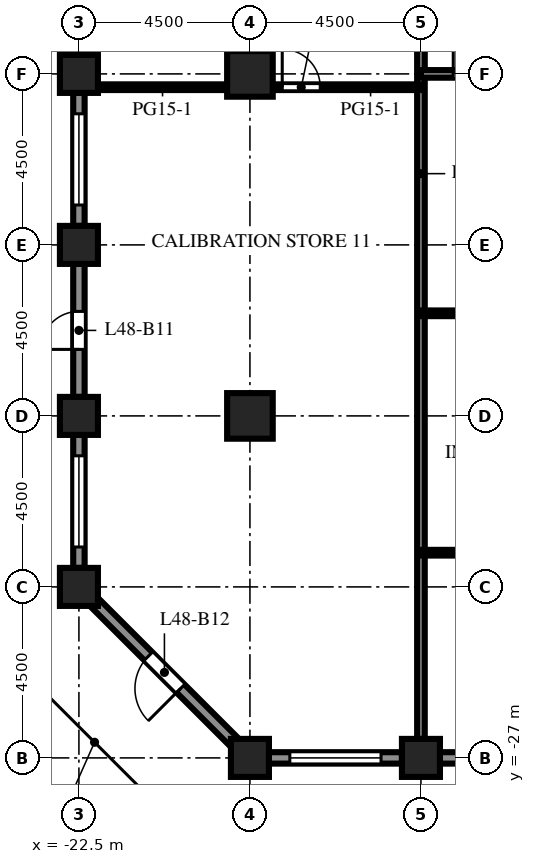
"""IFC4 building model, lengths in metres.
Left out: names, types, materials, properties, quantities, classifications, styles, units other than length and angle.
Written with IfcOpenShell. Run it as: python <this file> out.ifc"""

import sys

from ifc_helpers import new_model, si_unit, direction, frame, frame_2d, origin, origin_2d, place, context, subcontext, project, spatial, rectangle, extrude, element, fill, save


model = new_model("IFC4")
c1 = context("Model", 3, precision=1e-05, world=origin(), true_north=direction((0.0, 1.0)))
c2 = subcontext(c1, "Body", "Model", "MODEL_VIEW")
j1 = project(units=[si_unit("LENGTHUNIT", "METRE"), si_unit("PLANEANGLEUNIT", "RADIAN")], contexts=[c1])
p1 = place(None, origin())
s1 = spatial("IfcSite", under=j1, at=p1, CompositionType="ELEMENT")
p2 = place(p1, origin())
s2 = spatial("IfcBuilding", under=s1, at=p2, CompositionType="ELEMENT")
p3 = place(p2, frame((0.0, 0.0, 212.0)))
s3 = spatial("IfcBuildingStorey", under=s2, at=p3, CompositionType="ELEMENT", Elevation=212.0)
for number, where, z_axis, x_axis in (
    (1, (-22.5, -22.5, 0.0), (0.0, 0.0, 1.0), (1.0, 0.0, 0.0)),
    (2, (-22.5, -18.0, 0.0), (0.0, 0.0, 1.0), (1.0, 0.0, 0.0)),
    (3, (-22.5, -13.5, 0.0), (0.0, 0.0, 1.0), (1.0, 0.0, 0.0)),
    (4, (-22.5, -9.0, 0.0), (0.0, 0.0, 1.0), (1.0, 0.0, 0.0)),
    (5, (-18.0, -27.0, 0.0), (0.0, 0.0, 1.0), (1.0, 0.0, 0.0)),
    (6, (-13.5, -27.0, 0.0), (0.0, 0.0, 1.0), (1.0, 0.0, 0.0)),
):
    element("IfcColumn", number, at=place(p3, frame(where, z_axis=z_axis, x_axis=x_axis)), inside=s3, PredefinedType="COLUMN", context=c2, shape_type="SweptSolid", body=[
        extrude(rectangle(XDim=1.0, YDim=1.0, at=origin_2d()), origin(), (0.0, 0.0, 1.0), 4.1),
    ])
for number, where, z_axis, x_axis in (
    (7, (-18.0, -18.0, 0.0), (0.0, 0.0, 1.0), (1.0, 0.0, 0.0)),
    (8, (-18.0, -9.0, 0.0), (0.0, 0.0, 1.0), (1.0, 0.0, 0.0)),
):
    element("IfcColumn", number, at=place(p3, frame(where, z_axis=z_axis, x_axis=x_axis)), inside=s3, PredefinedType="COLUMN", context=c2, shape_type="SweptSolid", body=[
        extrude(rectangle(XDim=1.2, YDim=1.2, at=origin_2d()), origin(), (0.0, 0.0, 1.0), 4.1),
    ])
p4 = place(p3, frame((-14.0, -27.0, 0.0), z_axis=(0.0, 0.0, 1.0), x_axis=(-1.0, 0.0, 0.0)))
e9 = element("IfcWall", 9, at=p4, inside=s3, PredefinedType="SOLIDWALL", context=c2, shape_type="SweptSolid", body=[
    extrude(rectangle(XDim=3.5, YDim=0.3, at=frame_2d((1.75, 0.0))), origin(), (0.0, 0.0, 1.0), 2.85),
])
p5 = place(p4, frame((0.55, 0.0, 0.8)))
e10 = element("IfcOpeningElement", 10, at=p5, cuts=e9, PredefinedType="OPENING", context=c2, shape_type="SweptSolid", body=[
    extrude(rectangle(XDim=2.4, YDim=1.7, at=frame_2d((1.2, 0.85))), frame((0.0, 0.16, 0.0), z_axis=(0.0, -1.0, 0.0), x_axis=(1.0, 0.0, 0.0)), (0.0, 0.0, 1.0), 0.32),
])
p6 = place(p3, frame((-9.5, -27.0, 0.0), z_axis=(0.0, 0.0, 1.0), x_axis=(-1.0, 0.0, 0.0)))
e11 = element("IfcWall", 11, at=p6, inside=s3, PredefinedType="SOLIDWALL", context=c2, shape_type="SweptSolid", body=[
    extrude(rectangle(XDim=3.5, YDim=0.3, at=frame_2d((1.75, 0.0))), origin(), (0.0, 0.0, 1.0), 2.85),
])
p7 = place(p6, frame((1.25, 0.0, 0.0)))
e12 = element("IfcOpeningElement", 12, at=p7, cuts=e11, PredefinedType="OPENING", context=c2, shape_type="SweptSolid", body=[
    extrude(rectangle(XDim=1.0, YDim=2.2, at=frame_2d((0.5, 1.1))), frame((0.0, 0.16, 0.0), z_axis=(0.0, -1.0, 0.0), x_axis=(1.0, 0.0, 0.0)), (0.0, 0.0, 1.0), 0.32),
])
p8 = place(p3, frame((-22.5, -8.5, 0.0), z_axis=(0.0, 0.0, 1.0), x_axis=(0.0, 1.0, 0.0)))
e13 = element("IfcWall", 13, at=p8, inside=s3, PredefinedType="SOLIDWALL", context=c2, shape_type="SweptSolid", body=[
    extrude(rectangle(XDim=3.5, YDim=0.3, at=frame_2d((1.75, 0.0))), origin(), (0.0, 0.0, 1.0), 2.85),
])
p9 = place(p8, frame((0.55, 0.0, 0.8)))
e14 = element("IfcOpeningElement", 14, at=p9, cuts=e13, PredefinedType="OPENING", context=c2, shape_type="SweptSolid", body=[
    extrude(rectangle(XDim=2.4, YDim=1.7, at=frame_2d((1.2, 0.85))), frame((0.0, 0.16, 0.0), z_axis=(0.0, -1.0, 0.0), x_axis=(1.0, 0.0, 0.0)), (0.0, 0.0, 1.0), 0.32),
])
p10 = place(p3, frame((-22.5, -13.0, 0.0), z_axis=(0.0, 0.0, 1.0), x_axis=(0.0, 1.0, 0.0)))
e15 = element("IfcWall", 15, at=p10, inside=s3, PredefinedType="SOLIDWALL", context=c2, shape_type="SweptSolid", body=[
    extrude(rectangle(XDim=3.5, YDim=0.3, at=frame_2d((1.75, 0.0))), origin(), (0.0, 0.0, 1.0), 2.85),
])
p11 = place(p10, frame((0.55, 0.0, 0.8)))
e16 = element("IfcOpeningElement", 16, at=p11, cuts=e15, PredefinedType="OPENING", context=c2, shape_type="SweptSolid", body=[
    extrude(rectangle(XDim=2.4, YDim=1.7, at=frame_2d((1.2, 0.85))), frame((0.0, 0.16, 0.0), z_axis=(0.0, -1.0, 0.0), x_axis=(1.0, 0.0, 0.0)), (0.0, 0.0, 1.0), 0.32),
])
p12 = place(p3, frame((-22.5, -17.5, 0.0), z_axis=(0.0, 0.0, 1.0), x_axis=(0.0, 1.0, 0.0)))
e17 = element("IfcWall", 17, at=p12, inside=s3, PredefinedType="SOLIDWALL", context=c2, shape_type="SweptSolid", body=[
    extrude(rectangle(XDim=3.5, YDim=0.3, at=frame_2d((1.75, 0.0))), origin(), (0.0, 0.0, 1.0), 2.85),
])
p13 = place(p12, frame((1.25, 0.0, 0.0)))
e18 = element("IfcOpeningElement", 18, at=p13, cuts=e17, PredefinedType="OPENING", context=c2, shape_type="SweptSolid", body=[
    extrude(rectangle(XDim=1.0, YDim=2.2, at=frame_2d((0.5, 1.1))), frame((0.0, 0.16, 0.0), z_axis=(0.0, -1.0, 0.0), x_axis=(1.0, 0.0, 0.0)), (0.0, 0.0, 1.0), 0.32),
])
p14 = place(p3, frame((-22.5, -22.0, 0.0), z_axis=(0.0, 0.0, 1.0), x_axis=(0.0, 1.0, 0.0)))
e19 = element("IfcWall", 19, at=p14, inside=s3, PredefinedType="SOLIDWALL", context=c2, shape_type="SweptSolid", body=[
    extrude(rectangle(XDim=3.5, YDim=0.3, at=frame_2d((1.75, 0.0))), origin(), (0.0, 0.0, 1.0), 2.85),
])
p15 = place(p14, frame((0.55, 0.0, 0.8)))
e20 = element("IfcOpeningElement", 20, at=p15, cuts=e19, PredefinedType="OPENING", context=c2, shape_type="SweptSolid", body=[
    extrude(rectangle(XDim=2.4, YDim=1.7, at=frame_2d((1.2, 0.85))), frame((0.0, 0.16, 0.0), z_axis=(0.0, -1.0, 0.0), x_axis=(1.0, 0.0, 0.0)), (0.0, 0.0, 1.0), 0.32),
])
p16 = place(p3, frame((-18.394, -26.606, 0.0), z_axis=(0.0, 0.0, 1.0), x_axis=(-0.707106781187, 0.707106781187, 0.0)))
e21 = element("IfcWall", 21, at=p16, inside=s3, PredefinedType="SOLIDWALL", context=c2, shape_type="SweptSolid", body=[
    extrude(rectangle(XDim=5.25, YDim=0.3, at=frame_2d((2.625, 0.0))), origin(), (0.0, 0.0, 1.0), 2.85),
])
p17 = place(p16, frame((2.025, 0.0, 0.0)))
e22 = element("IfcOpeningElement", 22, at=p17, cuts=e21, PredefinedType="OPENING", context=c2, shape_type="SweptSolid", body=[
    extrude(rectangle(XDim=1.2, YDim=2.2, at=frame_2d((0.6, 1.1))), frame((0.0, 0.16, 0.0), z_axis=(0.0, -1.0, 0.0), x_axis=(1.0, 0.0, 0.0)), (0.0, 0.0, 1.0), 0.32),
])
p18 = place(p3, frame((-13.5, -26.5, 0.0), z_axis=(0.0, 0.0, 1.0), x_axis=(0.0, 1.0, 0.0)))
e23 = element("IfcWall", 23, at=p18, inside=s3, PredefinedType="PARTITIONING", context=c2, shape_type="SweptSolid", body=[
    extrude(rectangle(XDim=29.75, YDim=0.2, at=frame_2d((14.875, 0.0))), origin(), (0.0, 0.0, 1.0), 3.65),
])
p19 = place(p3, frame((21.0, -21.6, 0.0), z_axis=(0.0, 0.0, 1.0), x_axis=(-1.0, 0.0, 0.0)))
e24 = element("IfcWall", 24, at=p19, inside=s3, PredefinedType="PARTITIONING", context=c2, shape_type="SweptSolid", body=[
    extrude(rectangle(XDim=34.5, YDim=0.15, at=frame_2d((17.25, 0.0))), origin(), (0.0, 0.0, 1.0), 3.65),
])
p20 = place(p19, frame((29.9, 0.0, 0.0)))
e25 = element("IfcOpeningElement", 25, at=p20, cuts=e24, PredefinedType="OPENING", context=c2, shape_type="SweptSolid", body=[
    extrude(rectangle(XDim=1.0, YDim=2.1, at=frame_2d((0.5, 1.05))), frame((0.0, 0.085, 0.0), z_axis=(0.0, -1.0, 0.0), x_axis=(1.0, 0.0, 0.0)), (0.0, 0.0, 1.0), 0.17),
])
p21 = place(p19, frame((21.4, 0.0, 0.0)))
e26 = element("IfcOpeningElement", 26, at=p21, cuts=e24, PredefinedType="OPENING", context=c2, shape_type="SweptSolid", body=[
    extrude(rectangle(XDim=1.0, YDim=2.1, at=frame_2d((0.5, 1.05))), frame((0.0, 0.085, 0.0), z_axis=(0.0, -1.0, 0.0), x_axis=(1.0, 0.0, 0.0)), (0.0, 0.0, 1.0), 0.17),
])
p22 = place(p19, frame((13.15, 0.0, 0.0)))
e27 = element("IfcOpeningElement", 27, at=p22, cuts=e24, PredefinedType="OPENING", context=c2, shape_type="SweptSolid", body=[
    extrude(rectangle(XDim=1.0, YDim=2.1, at=frame_2d((0.5, 1.05))), frame((0.0, 0.085, 0.0), z_axis=(0.0, -1.0, 0.0), x_axis=(1.0, 0.0, 0.0)), (0.0, 0.0, 1.0), 0.17),
])
p23 = place(p19, frame((5.15, 0.0, 0.0)))
e28 = element("IfcOpeningElement", 28, at=p23, cuts=e24, PredefinedType="OPENING", context=c2, shape_type="SweptSolid", body=[
    extrude(rectangle(XDim=1.0, YDim=2.1, at=frame_2d((0.5, 1.05))), frame((0.0, 0.085, 0.0), z_axis=(0.0, -1.0, 0.0), x_axis=(1.0, 0.0, 0.0)), (0.0, 0.0, 1.0), 0.17),
])
p24 = place(p3, frame((21.0, -15.3, 0.0), z_axis=(0.0, 0.0, 1.0), x_axis=(-1.0, 0.0, 0.0)))
e29 = element("IfcWall", 29, at=p24, inside=s3, PredefinedType="PARTITIONING", context=c2, shape_type="SweptSolid", body=[
    extrude(rectangle(XDim=34.5, YDim=0.15, at=frame_2d((17.25, 0.0))), origin(), (0.0, 0.0, 1.0), 3.65),
])
p25 = place(p24, frame((28.9, 0.0, 0.0)))
e30 = element("IfcOpeningElement", 30, at=p25, cuts=e29, PredefinedType="OPENING", context=c2, shape_type="SweptSolid", body=[
    extrude(rectangle(XDim=1.0, YDim=2.1, at=frame_2d((0.5, 1.05))), frame((0.0, 0.085, 0.0), z_axis=(0.0, -1.0, 0.0), x_axis=(1.0, 0.0, 0.0)), (0.0, 0.0, 1.0), 0.17),
])
p26 = place(p24, frame((19.4, 0.0, 0.0)))
e31 = element("IfcOpeningElement", 31, at=p26, cuts=e29, PredefinedType="OPENING", context=c2, shape_type="SweptSolid", body=[
    extrude(rectangle(XDim=1.0, YDim=2.1, at=frame_2d((0.5, 1.05))), frame((0.0, 0.085, 0.0), z_axis=(0.0, -1.0, 0.0), x_axis=(1.0, 0.0, 0.0)), (0.0, 0.0, 1.0), 0.17),
])
p27 = place(p24, frame((14.15, 0.0, 0.0)))
e32 = element("IfcOpeningElement", 32, at=p27, cuts=e29, PredefinedType="OPENING", context=c2, shape_type="SweptSolid", body=[
    extrude(rectangle(XDim=1.0, YDim=2.1, at=frame_2d((0.5, 1.05))), frame((0.0, 0.085, 0.0), z_axis=(0.0, -1.0, 0.0), x_axis=(1.0, 0.0, 0.0)), (0.0, 0.0, 1.0), 0.17),
])
p28 = place(p24, frame((3.9, 0.0, 0.0)))
e33 = element("IfcOpeningElement", 33, at=p28, cuts=e29, PredefinedType="OPENING", context=c2, shape_type="SweptSolid", body=[
    extrude(rectangle(XDim=1.0, YDim=2.1, at=frame_2d((0.5, 1.05))), frame((0.0, 0.085, 0.0), z_axis=(0.0, -1.0, 0.0), x_axis=(1.0, 0.0, 0.0)), (0.0, 0.0, 1.0), 0.17),
])
p29 = place(p3, frame((-22.0, -9.35, 0.0), z_axis=(0.0, 0.0, 1.0), x_axis=(1.0, 0.0, 0.0)))
e34 = element("IfcWall", 34, at=p29, inside=s3, PredefinedType="PARTITIONING", context=c2, shape_type="SweptSolid", body=[
    extrude(rectangle(XDim=3.4, YDim=0.15, at=frame_2d((1.7, 0.0))), origin(), (0.0, 0.0, 1.0), 3.65),
])
p30 = place(p3, frame((-13.5, -9.35, 0.0), z_axis=(0.0, 0.0, 1.0), x_axis=(-1.0, 0.0, 0.0)))
e35 = element("IfcWall", 35, at=p30, inside=s3, PredefinedType="PARTITIONING", context=c2, shape_type="SweptSolid", body=[
    extrude(rectangle(XDim=3.9, YDim=0.15, at=frame_2d((1.95, 0.0))), origin(), (0.0, 0.0, 1.0), 3.65),
])
p31 = place(p30, frame((2.65, 0.0, 0.0)))
e36 = element("IfcOpeningElement", 36, at=p31, cuts=e35, PredefinedType="OPENING", context=c2, shape_type="SweptSolid", body=[
    extrude(rectangle(XDim=1.0, YDim=2.1, at=frame_2d((0.5, 1.05))), frame((0.0, 0.085, 0.0), z_axis=(0.0, -1.0, 0.0), x_axis=(1.0, 0.0, 0.0)), (0.0, 0.0, 1.0), 0.17),
])
p32 = place(p3, frame((-10.5, -9.0, 0.0), z_axis=(0.0, 0.0, 1.0), x_axis=(-1.0, 0.0, 0.0)))
e37 = element("IfcWall", 37, at=p32, inside=s3, PredefinedType="PARTITIONING", context=c2, shape_type="SweptSolid", body=[
    extrude(rectangle(XDim=3.0, YDim=0.2, at=frame_2d((1.5, 0.0))), origin(), (0.0, 0.0, 1.0), 3.65),
])
p33 = place(p32, frame((1.15, 0.0, 0.0)))
e38 = element("IfcOpeningElement", 38, at=p33, cuts=e37, PredefinedType="OPENING", context=c2, shape_type="SweptSolid", body=[
    extrude(rectangle(XDim=1.0, YDim=2.1, at=frame_2d((0.5, 1.05))), frame((0.0, 0.11, 0.0), z_axis=(0.0, -1.0, 0.0), x_axis=(1.0, 0.0, 0.0)), (0.0, 0.0, 1.0), 0.22),
])
p34 = place(p5, origin())
e39 = element("IfcWindow", 39, at=p34, inside=s3, PartitioningType="SINGLE_PANEL", PredefinedType="WINDOW", context=c2, shape_type="SweptSolid", body=[
    extrude(rectangle(XDim=2.4, YDim=1.7, at=frame_2d((1.2, 0.85))), frame((0.0, 0.03, 0.0), z_axis=(0.0, -1.0, 0.0), x_axis=(1.0, 0.0, 0.0)), (0.0, 0.0, 1.0), 0.06),
])
fill(e10, e39)
p35 = place(p11, origin())
e40 = element("IfcWindow", 40, at=p35, inside=s3, PartitioningType="SINGLE_PANEL", PredefinedType="WINDOW", context=c2, shape_type="SweptSolid", body=[
    extrude(rectangle(XDim=2.4, YDim=1.7, at=frame_2d((1.2, 0.85))), frame((0.0, 0.03, 0.0), z_axis=(0.0, -1.0, 0.0), x_axis=(1.0, 0.0, 0.0)), (0.0, 0.0, 1.0), 0.06),
])
fill(e16, e40)
p36 = place(p13, origin())
e41 = element("IfcDoor", 41, at=p36, inside=s3, OperationType="SINGLE_SWING_LEFT", PredefinedType="DOOR", context=c2, shape_type="SweptSolid", body=[
    extrude(rectangle(XDim=1.0, YDim=2.2, at=frame_2d((0.5, 1.1))), frame((0.0, 0.025, 0.0), z_axis=(0.0, -1.0, 0.0), x_axis=(1.0, 0.0, 0.0)), (0.0, 0.0, 1.0), 0.05),
])
fill(e18, e41)
p37 = place(p15, origin())
e42 = element("IfcWindow", 42, at=p37, inside=s3, PartitioningType="SINGLE_PANEL", PredefinedType="WINDOW", context=c2, shape_type="SweptSolid", body=[
    extrude(rectangle(XDim=2.4, YDim=1.7, at=frame_2d((1.2, 0.85))), frame((0.0, 0.03, 0.0), z_axis=(0.0, -1.0, 0.0), x_axis=(1.0, 0.0, 0.0)), (0.0, 0.0, 1.0), 0.06),
])
fill(e20, e42)
p38 = place(p17, origin())
e43 = element("IfcDoor", 43, at=p38, inside=s3, OperationType="SINGLE_SWING_LEFT", PredefinedType="DOOR", context=c2, shape_type="SweptSolid", body=[
    extrude(rectangle(XDim=1.2, YDim=2.2, at=frame_2d((0.6, 1.1))), frame((0.0, 0.025, 0.0), z_axis=(0.0, -1.0, 0.0), x_axis=(1.0, 0.0, 0.0)), (0.0, 0.0, 1.0), 0.05),
])
fill(e22, e43)
p39 = place(p31, origin())
e44 = element("IfcDoor", 44, at=p39, inside=s3, OperationType="SINGLE_SWING_RIGHT", PredefinedType="DOOR", context=c2, shape_type="SweptSolid", body=[
    extrude(rectangle(XDim=1.0, YDim=2.1, at=frame_2d((0.5, 1.05))), frame((0.0, 0.025, 0.0), z_axis=(0.0, -1.0, 0.0), x_axis=(1.0, 0.0, 0.0)), (0.0, 0.0, 1.0), 0.05),
])
fill(e36, e44)
p40 = place(p33, origin())
e45 = element("IfcDoor", 45, at=p40, inside=s3, OperationType="SINGLE_SWING_RIGHT", PredefinedType="DOOR", context=c2, shape_type="SweptSolid", body=[
    extrude(rectangle(XDim=1.0, YDim=2.1, at=frame_2d((0.5, 1.05))), frame((0.0, 0.025, 0.0), z_axis=(0.0, -1.0, 0.0), x_axis=(1.0, 0.0, 0.0)), (0.0, 0.0, 1.0), 0.05),
])
fill(e38, e45)
save(model, sys.argv[1])
